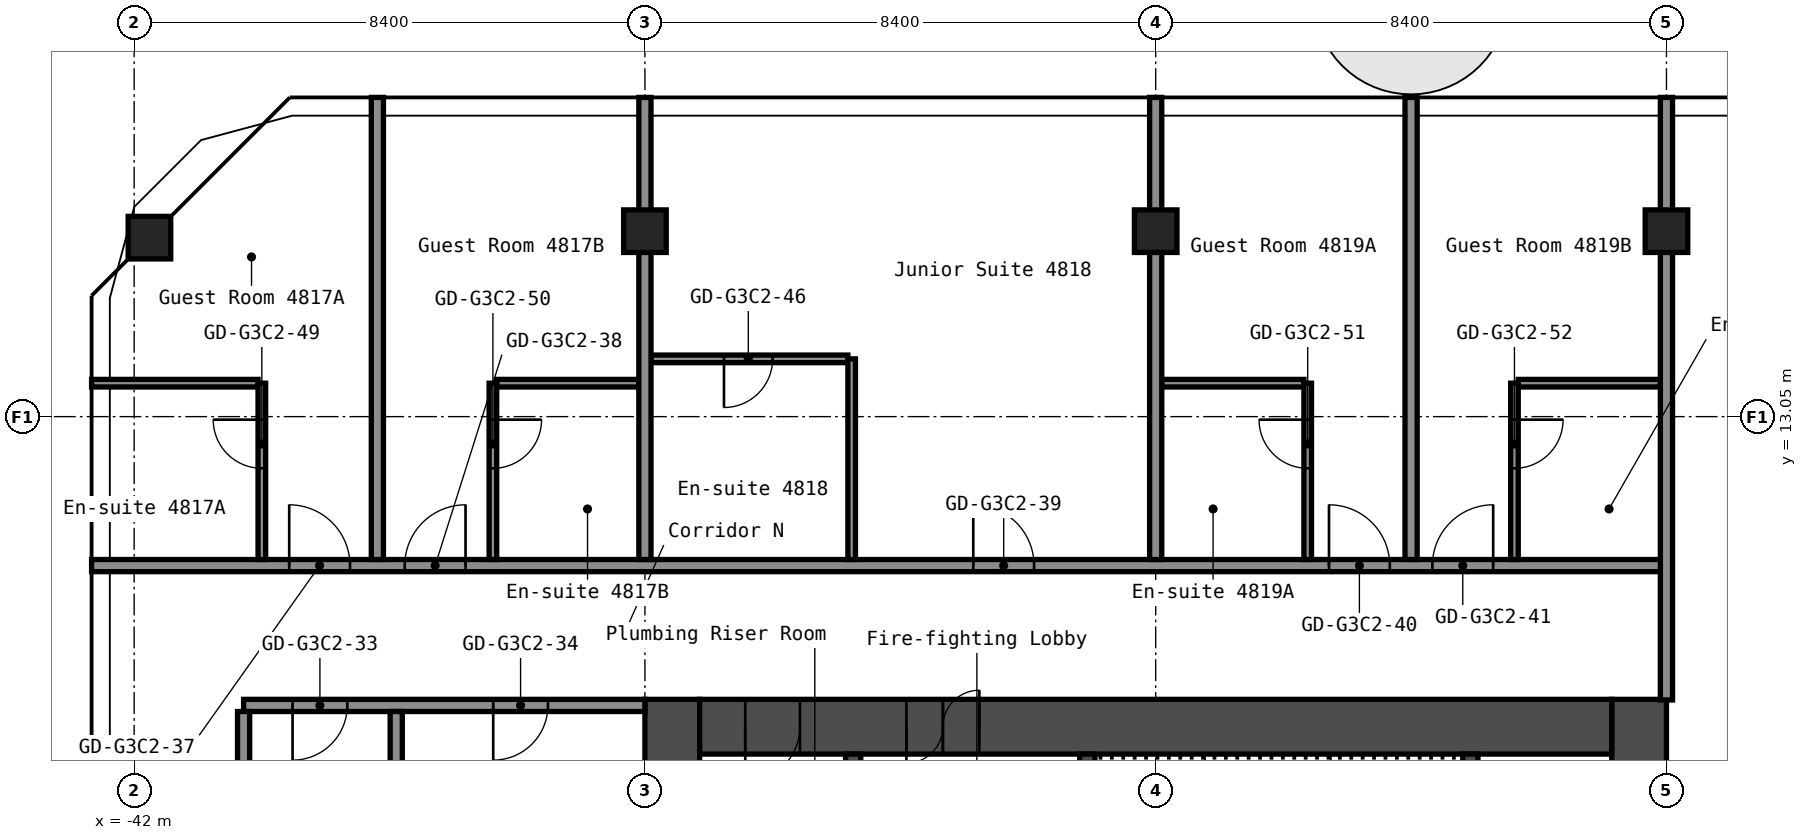
"""IFC4 building model, lengths in metres.
Left out: names, types, materials, properties, quantities, classifications, styles, units other than length and angle.
Written with IfcOpenShell. Run it as: python <this file> out.ifc"""

import sys

from ifc_helpers import new_model, si_unit, direction, frame, frame_2d, origin, origin_2d, place, context, subcontext, project, spatial, rectangle, hollow_rectangle, extrude, element, fill, save


model = new_model("IFC4")
c1 = context("Model", 3, precision=1e-05, world=origin(), true_north=direction((0.0, 1.0)))
c2 = subcontext(c1, "Body", "Model", "MODEL_VIEW")
j1 = project(units=[si_unit("LENGTHUNIT", "METRE"), si_unit("PLANEANGLEUNIT", "RADIAN")], contexts=[c1])
p1 = place(None, origin())
s1 = spatial("IfcSite", under=j1, at=p1, CompositionType="ELEMENT")
p2 = place(p1, origin())
s2 = spatial("IfcBuilding", under=s1, at=p2, CompositionType="ELEMENT")
p3 = place(p2, frame((0.0, 0.0, 169.4)))
s3 = spatial("IfcBuildingStorey", under=s2, at=p3, CompositionType="ELEMENT", Elevation=169.4)
for number, where, z_axis, x_axis in (
    (1, (-41.749, 15.994, 0.0), (0.0, 0.0, 1.0), (1.0, 0.0, 0.0)),
    (2, (-33.6, 16.1, 0.0), (0.0, 0.0, 1.0), (1.0, 0.0, 0.0)),
    (3, (-25.2, 16.1, 0.0), (0.0, 0.0, 1.0), (1.0, 0.0, 0.0)),
    (4, (-16.8, 16.1, 0.0), (0.0, 0.0, 1.0), (1.0, 0.0, 0.0)),
):
    element("IfcColumn", number, at=place(p3, frame(where, z_axis=z_axis, x_axis=x_axis)), inside=s3, PredefinedType="COLUMN", context=c2, shape_type="SweptSolid", body=[
        extrude(hollow_rectangle(XDim=0.7, YDim=0.7, WallThickness=0.028, at=origin_2d()), origin(), (0.0, 0.0, 1.0), 2.75),
    ])
p4 = place(p3, frame((-17.25, -8.4, 0.0), z_axis=(0.0, 0.0, 1.0), x_axis=(0.0, 1.0, 0.0)))
e5 = element("IfcWall", 5, at=p4, inside=s3, PredefinedType="SHEAR", context=c2, shape_type="SweptSolid", body=[
    extrude(rectangle(XDim=16.8, YDim=0.9, at=frame_2d((8.4, 0.0))), origin(), (0.0, 0.0, 1.0), 2.75),
])
p5 = place(p4, frame((7.1, 0.0, 0.0)))
e6 = element("IfcOpeningElement", 6, at=p5, cuts=e5, PredefinedType="OPENING", context=c2, shape_type="SweptSolid", body=[
    extrude(rectangle(XDim=1.6, YDim=2.1, at=frame_2d((0.8, 1.05))), frame((0.0, 0.46, 0.0), z_axis=(0.0, -1.0, 0.0), x_axis=(1.0, 0.0, 0.0)), (0.0, 0.0, 1.0), 0.92),
])
p6 = place(p3, frame((-33.15, -8.4, 0.0), z_axis=(0.0, 0.0, 1.0), x_axis=(0.0, 1.0, 0.0)))
e7 = element("IfcWall", 7, at=p6, inside=s3, PredefinedType="SHEAR", context=c2, shape_type="SweptSolid", body=[
    extrude(rectangle(XDim=16.8, YDim=0.9, at=frame_2d((8.4, 0.0))), origin(), (0.0, 0.0, 1.0), 2.75),
])
p7 = place(p3, frame((-32.7, 7.95, 0.0), z_axis=(0.0, 0.0, 1.0), x_axis=(1.0, 0.0, 0.0)))
e8 = element("IfcWall", 8, at=p7, inside=s3, PredefinedType="SHEAR", context=c2, shape_type="SweptSolid", body=[
    extrude(rectangle(XDim=15.0, YDim=0.9, at=frame_2d((7.5, 0.0))), origin(), (0.0, 0.0, 1.0), 2.75),
])
p8 = place(p7, frame((3.4, 0.0, 0.0)))
e9 = element("IfcOpeningElement", 9, at=p8, cuts=e8, PredefinedType="OPENING", context=c2, shape_type="SweptSolid", body=[
    extrude(rectangle(XDim=1.2, YDim=2.1, at=frame_2d((0.6, 1.05))), frame((0.0, 0.46, 0.0), z_axis=(0.0, -1.0, 0.0), x_axis=(1.0, 0.0, 0.0)), (0.0, 0.0, 1.0), 0.92),
])
p9 = place(p7, frame((0.75, 0.0, 0.0)))
e10 = element("IfcOpeningElement", 10, at=p9, cuts=e8, PredefinedType="OPENING", context=c2, shape_type="SweptSolid", body=[
    extrude(rectangle(XDim=0.9, YDim=2.1, at=frame_2d((0.45, 1.05))), frame((0.0, 0.46, 0.0), z_axis=(0.0, -1.0, 0.0), x_axis=(1.0, 0.0, 0.0)), (0.0, 0.0, 1.0), 0.92),
])
p10 = place(p3, frame((-20.025, 1.2, 0.0), z_axis=(0.0, 0.0, 1.0), x_axis=(0.0, 1.0, 0.0)))
e11 = element("IfcWall", 11, at=p10, inside=s3, PredefinedType="SHEAR", context=c2, shape_type="SweptSolid", body=[
    extrude(rectangle(XDim=6.3, YDim=0.25, at=frame_2d((3.15, 0.0))), origin(), (0.0, 0.0, 1.0), 2.75),
])
p11 = place(p3, frame((-26.325, 3.75, 0.0), z_axis=(0.0, 0.0, 1.0), x_axis=(0.0, 1.0, 0.0)))
e12 = element("IfcWall", 12, at=p11, inside=s3, PredefinedType="SHEAR", context=c2, shape_type="SweptSolid", body=[
    extrude(rectangle(XDim=3.75, YDim=0.25, at=frame_2d((1.875, 0.0))), origin(), (0.0, 0.0, 1.0), 2.75),
])
p12 = place(p11, frame((1.25, 0.0, 0.0)))
e13 = element("IfcOpeningElement", 13, at=p12, cuts=e12, PredefinedType="OPENING", context=c2, shape_type="SweptSolid", body=[
    extrude(rectangle(XDim=1.2, YDim=2.1, at=frame_2d((0.6, 1.05))), frame((0.0, 0.135, 0.0), z_axis=(0.0, -1.0, 0.0), x_axis=(1.0, 0.0, 0.0)), (0.0, 0.0, 1.0), 0.27),
])
p13 = place(p3, frame((-30.175, 1.45, 0.0), z_axis=(0.0, 0.0, 1.0), x_axis=(0.0, 1.0, 0.0)))
e14 = element("IfcWall", 14, at=p13, inside=s3, PredefinedType="SHEAR", context=c2, shape_type="SweptSolid", body=[
    extrude(rectangle(XDim=6.05, YDim=0.25, at=frame_2d((3.025, 0.0))), origin(), (0.0, 0.0, 1.0), 2.75),
])
p14 = place(p13, frame((2.625, 0.0, 0.0)))
e15 = element("IfcOpeningElement", 15, at=p14, cuts=e14, PredefinedType="OPENING", context=c2, shape_type="SweptSolid", body=[
    extrude(rectangle(XDim=1.1, YDim=2.1, at=frame_2d((0.55, 1.05))), frame((0.0, 0.135, 0.0), z_axis=(0.0, -1.0, 0.0), x_axis=(1.0, 0.0, 0.0)), (0.0, 0.0, 1.0), 0.27),
])
p15 = place(p3, frame((-40.2, 8.3, 0.0), z_axis=(0.0, 0.0, 1.0), x_axis=(1.0, 0.0, 0.0)))
e16 = element("IfcWall", 16, at=p15, inside=s3, PredefinedType="PARTITIONING", context=c2, shape_type="SweptSolid", body=[
    extrude(rectangle(XDim=6.6, YDim=0.2, at=frame_2d((3.3, 0.0))), origin(), (0.0, 0.0, 1.0), 2.75),
])
p16 = place(p15, frame((0.805, 0.0, 0.0)))
e17 = element("IfcOpeningElement", 17, at=p16, cuts=e16, PredefinedType="OPENING", context=c2, shape_type="SweptSolid", body=[
    extrude(rectangle(XDim=0.9, YDim=2.1, at=frame_2d((0.45, 1.05))), frame((0.0, 0.11, 0.0), z_axis=(0.0, -1.0, 0.0), x_axis=(1.0, 0.0, 0.0)), (0.0, 0.0, 1.0), 0.22),
])
p17 = place(p15, frame((4.105, 0.0, 0.0)))
e18 = element("IfcOpeningElement", 18, at=p17, cuts=e16, PredefinedType="OPENING", context=c2, shape_type="SweptSolid", body=[
    extrude(rectangle(XDim=0.9, YDim=2.1, at=frame_2d((0.45, 1.05))), frame((0.0, 0.11, 0.0), z_axis=(0.0, -1.0, 0.0), x_axis=(1.0, 0.0, 0.0)), (0.0, 0.0, 1.0), 0.22),
])
p18 = place(p3, frame((-42.7, 10.6, 0.0), z_axis=(0.0, 0.0, 1.0), x_axis=(1.0, 0.0, 0.0)))
e19 = element("IfcWall", 19, at=p18, inside=s3, PredefinedType="PARTITIONING", context=c2, shape_type="SweptSolid", body=[
    extrude(rectangle(XDim=25.9, YDim=0.2, at=frame_2d((12.95, 0.0))), origin(), (0.0, 0.0, 1.0), 2.75),
])
p19 = place(p18, frame((3.25, 0.0, 0.0)))
e20 = element("IfcOpeningElement", 20, at=p19, cuts=e19, PredefinedType="OPENING", context=c2, shape_type="SweptSolid", body=[
    extrude(rectangle(XDim=1.0, YDim=2.1, at=frame_2d((0.5, 1.05))), frame((0.0, 0.11, 0.0), z_axis=(0.0, -1.0, 0.0), x_axis=(1.0, 0.0, 0.0)), (0.0, 0.0, 1.0), 0.22),
])
p20 = place(p18, frame((5.15, 0.0, 0.0)))
e21 = element("IfcOpeningElement", 21, at=p20, cuts=e19, PredefinedType="OPENING", context=c2, shape_type="SweptSolid", body=[
    extrude(rectangle(XDim=1.0, YDim=2.1, at=frame_2d((0.5, 1.05))), frame((0.0, 0.11, 0.0), z_axis=(0.0, -1.0, 0.0), x_axis=(1.0, 0.0, 0.0)), (0.0, 0.0, 1.0), 0.22),
])
p21 = place(p18, frame((14.5, 0.0, 0.0)))
e22 = element("IfcOpeningElement", 22, at=p21, cuts=e19, PredefinedType="OPENING", context=c2, shape_type="SweptSolid", body=[
    extrude(rectangle(XDim=1.0, YDim=2.1, at=frame_2d((0.5, 1.05))), frame((0.0, 0.11, 0.0), z_axis=(0.0, -1.0, 0.0), x_axis=(1.0, 0.0, 0.0)), (0.0, 0.0, 1.0), 0.22),
])
p22 = place(p18, frame((20.35, 0.0, 0.0)))
e23 = element("IfcOpeningElement", 23, at=p22, cuts=e19, PredefinedType="OPENING", context=c2, shape_type="SweptSolid", body=[
    extrude(rectangle(XDim=1.0, YDim=2.1, at=frame_2d((0.5, 1.05))), frame((0.0, 0.11, 0.0), z_axis=(0.0, -1.0, 0.0), x_axis=(1.0, 0.0, 0.0)), (0.0, 0.0, 1.0), 0.22),
])
p23 = place(p18, frame((22.05, 0.0, 0.0)))
e24 = element("IfcOpeningElement", 24, at=p23, cuts=e19, PredefinedType="OPENING", context=c2, shape_type="SweptSolid", body=[
    extrude(rectangle(XDim=1.0, YDim=2.1, at=frame_2d((0.5, 1.05))), frame((0.0, 0.11, 0.0), z_axis=(0.0, -1.0, 0.0), x_axis=(1.0, 0.0, 0.0)), (0.0, 0.0, 1.0), 0.22),
])
p24 = place(p3, frame((-42.7, 13.6, 0.0), z_axis=(0.0, 0.0, 1.0), x_axis=(1.0, 0.0, 0.0)))
e25 = element("IfcWall", 25, at=p24, inside=s3, PredefinedType="PARTITIONING", context=c2, shape_type="SweptSolid", body=[
    extrude(rectangle(XDim=2.738, YDim=0.125, at=frame_2d((1.369, 0.0))), origin(), (0.0, 0.0, 1.0), 2.75),
])
for number, where, z_axis, x_axis in (
    (26, (-36.038, 13.6, 0.0), (0.0, 0.0, 1.0), (1.0, 0.0, 0.0)),
    (27, (-25.1, 13.6, 0.0), (0.0, 0.0, 1.0), (1.0, 0.0, 0.0)),
    (28, (-19.238, 13.6, 0.0), (0.0, 0.0, 1.0), (1.0, 0.0, 0.0)),
):
    element("IfcWall", number, at=place(p3, frame(where, z_axis=z_axis, x_axis=x_axis)), inside=s3, PredefinedType="PARTITIONING", context=c2, shape_type="SweptSolid", body=[
        extrude(rectangle(XDim=2.338, YDim=0.125, at=frame_2d((1.169, 0.0))), origin(), (0.0, 0.0, 1.0), 2.75),
    ])
p25 = place(p3, frame((-33.5, 14.0, 0.0), z_axis=(0.0, 0.0, 1.0), x_axis=(1.0, 0.0, 0.0)))
e29 = element("IfcWall", 29, at=p25, inside=s3, PredefinedType="PARTITIONING", context=c2, shape_type="SweptSolid", body=[
    extrude(rectangle(XDim=3.238, YDim=0.125, at=frame_2d((1.619, 0.0))), origin(), (0.0, 0.0, 1.0), 2.75),
])
p26 = place(p25, frame((1.2, 0.0, 0.0)))
e30 = element("IfcOpeningElement", 30, at=p26, cuts=e29, PredefinedType="OPENING", context=c2, shape_type="SweptSolid", body=[
    extrude(rectangle(XDim=0.8, YDim=2.1, at=frame_2d((0.4, 1.05))), frame((0.0, 0.073, 0.0), z_axis=(0.0, -1.0, 0.0), x_axis=(1.0, 0.0, 0.0)), (0.0, 0.0, 1.0), 0.145),
])
p27 = place(p3, frame((-40.2, -8.2, 0.0), z_axis=(0.0, 0.0, 1.0), x_axis=(0.0, 1.0, 0.0)))
e31 = element("IfcWall", 31, at=p27, inside=s3, PredefinedType="PARTITIONING", context=c2, shape_type="SweptSolid", body=[
    extrude(rectangle(XDim=16.4, YDim=0.2, at=frame_2d((8.2, 0.0))), origin(), (0.0, 0.0, 1.0), 2.75),
])
p28 = place(p3, frame((-39.9, 10.7, 0.0), z_axis=(0.0, 0.0, 1.0), x_axis=(0.0, 1.0, 0.0)))
e32 = element("IfcWall", 32, at=p28, inside=s3, PredefinedType="PARTITIONING", context=c2, shape_type="SweptSolid", body=[
    extrude(rectangle(XDim=2.9, YDim=0.125, at=frame_2d((1.45, 0.0))), origin(), (0.0, 0.0, 1.0), 2.75),
])
p29 = place(p28, frame((1.5, 0.0, 0.0)))
e33 = element("IfcOpeningElement", 33, at=p29, cuts=e32, PredefinedType="OPENING", context=c2, shape_type="SweptSolid", body=[
    extrude(rectangle(XDim=0.8, YDim=2.1, at=frame_2d((0.4, 1.05))), frame((0.0, 0.073, 0.0), z_axis=(0.0, -1.0, 0.0), x_axis=(1.0, 0.0, 0.0)), (0.0, 0.0, 1.0), 0.145),
])
p30 = place(p3, frame((-38.0, 10.7, 0.0), z_axis=(0.0, 0.0, 1.0), x_axis=(0.0, 1.0, 0.0)))
e34 = element("IfcWall", 34, at=p30, inside=s3, PredefinedType="PARTITIONING", context=c2, shape_type="SweptSolid", body=[
    extrude(rectangle(XDim=7.6, YDim=0.2, at=frame_2d((3.8, 0.0))), origin(), (0.0, 0.0, 1.0), 2.75),
])
p31 = place(p3, frame((-37.69, 0.0, 0.0), z_axis=(0.0, 0.0, 1.0), x_axis=(0.0, 1.0, 0.0)))
e35 = element("IfcWall", 35, at=p31, inside=s3, PredefinedType="PARTITIONING", context=c2, shape_type="SweptSolid", body=[
    extrude(rectangle(XDim=8.2, YDim=0.2, at=frame_2d((4.1, 0.0))), origin(), (0.0, 0.0, 1.0), 2.75),
])
p32 = place(p3, frame((-36.1, 10.7, 0.0), z_axis=(0.0, 0.0, 1.0), x_axis=(0.0, 1.0, 0.0)))
e36 = element("IfcWall", 36, at=p32, inside=s3, PredefinedType="PARTITIONING", context=c2, shape_type="SweptSolid", body=[
    extrude(rectangle(XDim=2.9, YDim=0.125, at=frame_2d((1.45, 0.0))), origin(), (0.0, 0.0, 1.0), 2.75),
])
p33 = place(p32, frame((1.5, 0.0, 0.0)))
e37 = element("IfcOpeningElement", 37, at=p33, cuts=e36, PredefinedType="OPENING", context=c2, shape_type="SweptSolid", body=[
    extrude(rectangle(XDim=0.8, YDim=2.1, at=frame_2d((0.4, 1.05))), frame((0.0, 0.073, 0.0), z_axis=(0.0, -1.0, 0.0), x_axis=(1.0, 0.0, 0.0)), (0.0, 0.0, 1.0), 0.145),
])
p34 = place(p3, frame((-33.6, 10.7, 0.0), z_axis=(0.0, 0.0, 1.0), x_axis=(0.0, 1.0, 0.0)))
e38 = element("IfcWall", 38, at=p34, inside=s3, PredefinedType="PARTITIONING", context=c2, shape_type="SweptSolid", body=[
    extrude(rectangle(XDim=7.6, YDim=0.2, at=frame_2d((3.8, 0.0))), origin(), (0.0, 0.0, 1.0), 2.75),
])
p35 = place(p3, frame((-30.2, 10.7, 0.0), z_axis=(0.0, 0.0, 1.0), x_axis=(0.0, 1.0, 0.0)))
e39 = element("IfcWall", 39, at=p35, inside=s3, PredefinedType="PARTITIONING", context=c2, shape_type="SweptSolid", body=[
    extrude(rectangle(XDim=3.3, YDim=0.125, at=frame_2d((1.65, 0.0))), origin(), (0.0, 0.0, 1.0), 2.75),
])
p36 = place(p3, frame((-25.2, 10.7, 0.0), z_axis=(0.0, 0.0, 1.0), x_axis=(0.0, 1.0, 0.0)))
e40 = element("IfcWall", 40, at=p36, inside=s3, PredefinedType="PARTITIONING", context=c2, shape_type="SweptSolid", body=[
    extrude(rectangle(XDim=7.6, YDim=0.2, at=frame_2d((3.8, 0.0))), origin(), (0.0, 0.0, 1.0), 2.75),
])
p37 = place(p3, frame((-22.7, 10.7, 0.0), z_axis=(0.0, 0.0, 1.0), x_axis=(0.0, 1.0, 0.0)))
e41 = element("IfcWall", 41, at=p37, inside=s3, PredefinedType="PARTITIONING", context=c2, shape_type="SweptSolid", body=[
    extrude(rectangle(XDim=2.9, YDim=0.125, at=frame_2d((1.45, 0.0))), origin(), (0.0, 0.0, 1.0), 2.75),
])
p38 = place(p37, frame((1.5, 0.0, 0.0)))
e42 = element("IfcOpeningElement", 42, at=p38, cuts=e41, PredefinedType="OPENING", context=c2, shape_type="SweptSolid", body=[
    extrude(rectangle(XDim=0.8, YDim=2.1, at=frame_2d((0.4, 1.05))), frame((0.0, 0.073, 0.0), z_axis=(0.0, -1.0, 0.0), x_axis=(1.0, 0.0, 0.0)), (0.0, 0.0, 1.0), 0.145),
])
p39 = place(p3, frame((-21.0, 10.7, 0.0), z_axis=(0.0, 0.0, 1.0), x_axis=(0.0, 1.0, 0.0)))
e43 = element("IfcWall", 43, at=p39, inside=s3, PredefinedType="PARTITIONING", context=c2, shape_type="SweptSolid", body=[
    extrude(rectangle(XDim=7.6, YDim=0.2, at=frame_2d((3.8, 0.0))), origin(), (0.0, 0.0, 1.0), 2.75),
])
p40 = place(p3, frame((-19.3, 10.7, 0.0), z_axis=(0.0, 0.0, 1.0), x_axis=(0.0, 1.0, 0.0)))
e44 = element("IfcWall", 44, at=p40, inside=s3, PredefinedType="PARTITIONING", context=c2, shape_type="SweptSolid", body=[
    extrude(rectangle(XDim=2.9, YDim=0.125, at=frame_2d((1.45, 0.0))), origin(), (0.0, 0.0, 1.0), 2.75),
])
p41 = place(p40, frame((1.5, 0.0, 0.0)))
e45 = element("IfcOpeningElement", 45, at=p41, cuts=e44, PredefinedType="OPENING", context=c2, shape_type="SweptSolid", body=[
    extrude(rectangle(XDim=0.8, YDim=2.1, at=frame_2d((0.4, 1.05))), frame((0.0, 0.073, 0.0), z_axis=(0.0, -1.0, 0.0), x_axis=(1.0, 0.0, 0.0)), (0.0, 0.0, 1.0), 0.145),
])
p42 = place(p3, frame((-16.8, 8.39, 0.0), z_axis=(0.0, 0.0, 1.0), x_axis=(0.0, 1.0, 0.0)))
e46 = element("IfcWall", 46, at=p42, inside=s3, PredefinedType="PARTITIONING", context=c2, shape_type="SweptSolid", body=[
    extrude(rectangle(XDim=9.91, YDim=0.2, at=frame_2d((4.955, 0.0))), origin(), (0.0, 0.0, 1.0), 2.75),
])
p43 = place(p8, origin())
e47 = element("IfcDoor", 47, at=p43, inside=s3, OperationType="DOUBLE_DOOR_SINGLE_SWING", PredefinedType="DOOR", context=c2, shape_type="SweptSolid", body=[
    extrude(rectangle(XDim=1.2, YDim=2.1, at=frame_2d((0.6, 1.05))), frame((0.0, 0.025, 0.0), z_axis=(0.0, -1.0, 0.0), x_axis=(1.0, 0.0, 0.0)), (0.0, 0.0, 1.0), 0.05),
])
fill(e9, e47)
p44 = place(p9, origin())
e48 = element("IfcDoor", 48, at=p44, inside=s3, OperationType="SINGLE_SWING_LEFT", PredefinedType="DOOR", context=c2, shape_type="SweptSolid", body=[
    extrude(rectangle(XDim=0.9, YDim=2.1, at=frame_2d((0.45, 1.05))), frame((0.0, 0.025, 0.0), z_axis=(0.0, -1.0, 0.0), x_axis=(1.0, 0.0, 0.0)), (0.0, 0.0, 1.0), 0.05),
])
fill(e10, e48)
p45 = place(p16, origin())
e49 = element("IfcDoor", 49, at=p45, inside=s3, OperationType="SINGLE_SWING_LEFT", PredefinedType="DOOR", context=c2, shape_type="SweptSolid", body=[
    extrude(rectangle(XDim=0.9, YDim=2.1, at=frame_2d((0.45, 1.05))), frame((0.0, 0.025, 0.0), z_axis=(0.0, -1.0, 0.0), x_axis=(1.0, 0.0, 0.0)), (0.0, 0.0, 1.0), 0.05),
])
fill(e17, e49)
p46 = place(p17, origin())
e50 = element("IfcDoor", 50, at=p46, inside=s3, OperationType="SINGLE_SWING_LEFT", PredefinedType="DOOR", context=c2, shape_type="SweptSolid", body=[
    extrude(rectangle(XDim=0.9, YDim=2.1, at=frame_2d((0.45, 1.05))), frame((0.0, 0.025, 0.0), z_axis=(0.0, -1.0, 0.0), x_axis=(1.0, 0.0, 0.0)), (0.0, 0.0, 1.0), 0.05),
])
fill(e18, e50)
p47 = place(p19, origin())
e51 = element("IfcDoor", 51, at=p47, inside=s3, OperationType="SINGLE_SWING_RIGHT", PredefinedType="DOOR", context=c2, shape_type="SweptSolid", body=[
    extrude(rectangle(XDim=1.0, YDim=2.1, at=frame_2d((0.5, 1.05))), frame((0.0, 0.025, 0.0), z_axis=(0.0, -1.0, 0.0), x_axis=(1.0, 0.0, 0.0)), (0.0, 0.0, 1.0), 0.05),
])
fill(e20, e51)
p48 = place(p20, origin())
e52 = element("IfcDoor", 52, at=p48, inside=s3, OperationType="SINGLE_SWING_LEFT", PredefinedType="DOOR", context=c2, shape_type="SweptSolid", body=[
    extrude(rectangle(XDim=1.0, YDim=2.1, at=frame_2d((0.5, 1.05))), frame((0.0, 0.025, 0.0), z_axis=(0.0, -1.0, 0.0), x_axis=(1.0, 0.0, 0.0)), (0.0, 0.0, 1.0), 0.05),
])
fill(e21, e52)
p49 = place(p21, origin())
e53 = element("IfcDoor", 53, at=p49, inside=s3, OperationType="SINGLE_SWING_RIGHT", PredefinedType="DOOR", context=c2, shape_type="SweptSolid", body=[
    extrude(rectangle(XDim=1.0, YDim=2.1, at=frame_2d((0.5, 1.05))), frame((0.0, 0.025, 0.0), z_axis=(0.0, -1.0, 0.0), x_axis=(1.0, 0.0, 0.0)), (0.0, 0.0, 1.0), 0.05),
])
fill(e22, e53)
p50 = place(p22, origin())
e54 = element("IfcDoor", 54, at=p50, inside=s3, OperationType="SINGLE_SWING_RIGHT", PredefinedType="DOOR", context=c2, shape_type="SweptSolid", body=[
    extrude(rectangle(XDim=1.0, YDim=2.1, at=frame_2d((0.5, 1.05))), frame((0.0, 0.025, 0.0), z_axis=(0.0, -1.0, 0.0), x_axis=(1.0, 0.0, 0.0)), (0.0, 0.0, 1.0), 0.05),
])
fill(e23, e54)
p51 = place(p23, origin())
e55 = element("IfcDoor", 55, at=p51, inside=s3, OperationType="SINGLE_SWING_LEFT", PredefinedType="DOOR", context=c2, shape_type="SweptSolid", body=[
    extrude(rectangle(XDim=1.0, YDim=2.1, at=frame_2d((0.5, 1.05))), frame((0.0, 0.025, 0.0), z_axis=(0.0, -1.0, 0.0), x_axis=(1.0, 0.0, 0.0)), (0.0, 0.0, 1.0), 0.05),
])
fill(e24, e55)
p52 = place(p26, origin())
e56 = element("IfcDoor", 56, at=p52, inside=s3, OperationType="SINGLE_SWING_LEFT", PredefinedType="DOOR", context=c2, shape_type="SweptSolid", body=[
    extrude(rectangle(XDim=0.8, YDim=2.1, at=frame_2d((0.4, 1.05))), frame((0.0, 0.025, 0.0), z_axis=(0.0, -1.0, 0.0), x_axis=(1.0, 0.0, 0.0)), (0.0, 0.0, 1.0), 0.05),
])
fill(e30, e56)
p53 = place(p29, origin())
e57 = element("IfcDoor", 57, at=p53, inside=s3, OperationType="SINGLE_SWING_LEFT", PredefinedType="DOOR", context=c2, shape_type="SweptSolid", body=[
    extrude(rectangle(XDim=0.8, YDim=2.1, at=frame_2d((0.4, 1.05))), frame((0.0, 0.025, 0.0), z_axis=(0.0, -1.0, 0.0), x_axis=(1.0, 0.0, 0.0)), (0.0, 0.0, 1.0), 0.05),
])
fill(e33, e57)
p54 = place(p33, origin())
e58 = element("IfcDoor", 58, at=p54, inside=s3, OperationType="SINGLE_SWING_RIGHT", PredefinedType="DOOR", context=c2, shape_type="SweptSolid", body=[
    extrude(rectangle(XDim=0.8, YDim=2.1, at=frame_2d((0.4, 1.05))), frame((0.0, 0.025, 0.0), z_axis=(0.0, -1.0, 0.0), x_axis=(1.0, 0.0, 0.0)), (0.0, 0.0, 1.0), 0.05),
])
fill(e37, e58)
p55 = place(p38, origin())
e59 = element("IfcDoor", 59, at=p55, inside=s3, OperationType="SINGLE_SWING_LEFT", PredefinedType="DOOR", context=c2, shape_type="SweptSolid", body=[
    extrude(rectangle(XDim=0.8, YDim=2.1, at=frame_2d((0.4, 1.05))), frame((0.0, 0.025, 0.0), z_axis=(0.0, -1.0, 0.0), x_axis=(1.0, 0.0, 0.0)), (0.0, 0.0, 1.0), 0.05),
])
fill(e42, e59)
p56 = place(p41, origin())
e60 = element("IfcDoor", 60, at=p56, inside=s3, OperationType="SINGLE_SWING_RIGHT", PredefinedType="DOOR", context=c2, shape_type="SweptSolid", body=[
    extrude(rectangle(XDim=0.8, YDim=2.1, at=frame_2d((0.4, 1.05))), frame((0.0, 0.025, 0.0), z_axis=(0.0, -1.0, 0.0), x_axis=(1.0, 0.0, 0.0)), (0.0, 0.0, 1.0), 0.05),
])
fill(e45, e60)
save(model, sys.argv[1])
